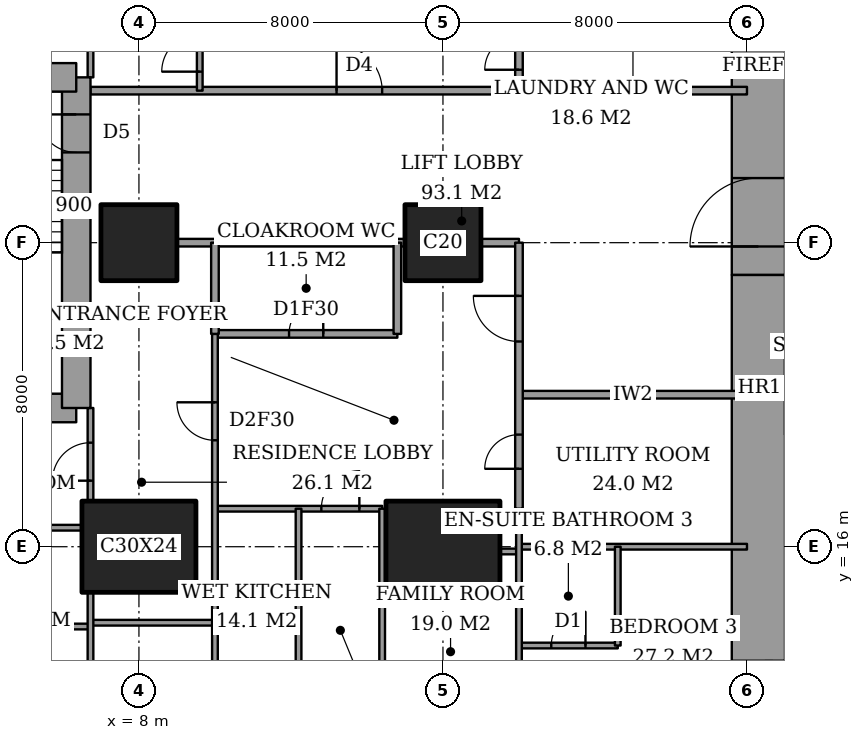
"""IFC4 building model, lengths in metres.
Left out: names, types, materials, properties, quantities, classifications, styles, units other than length and angle.
Written with IfcOpenShell. Run it as: python <this file> out.ifc"""

import sys

from ifc_helpers import new_model, si_unit, direction, frame, frame_2d, origin, origin_2d, place, context, subcontext, project, spatial, rectangle, extrude, element, fill, save


model = new_model("IFC4")
c1 = context("Model", 3, precision=1e-05, world=origin(), true_north=direction((0.0, 1.0)))
c2 = subcontext(c1, "Body", "Model", "MODEL_VIEW")
j1 = project(units=[si_unit("LENGTHUNIT", "METRE"), si_unit("PLANEANGLEUNIT", "RADIAN")], contexts=[c1])
p1 = place(None, origin())
s1 = spatial("IfcSite", under=j1, at=p1, CompositionType="ELEMENT")
p2 = place(p1, origin())
s2 = spatial("IfcBuilding", under=s1, at=p2, CompositionType="ELEMENT")
p3 = place(p2, frame((0.0, 0.0, 47.6)))
s3 = spatial("IfcBuildingStorey", under=s2, at=p3, CompositionType="ELEMENT", Elevation=47.6)
p4 = place(p3, frame((8.0, 16.0, 0.0), z_axis=(0.0, 0.0, 1.0), x_axis=(1.0, 0.0, 0.0)))
e1 = element("IfcColumn", 1, at=p4, inside=s3, PredefinedType="COLUMN", context=c2, shape_type="SweptSolid", body=[
    extrude(rectangle(XDim=3.0, YDim=2.4, at=origin_2d()), origin(), (0.0, 0.0, 1.0), 3.6),
])
p5 = place(p3, frame((8.0, 24.0, 0.0), z_axis=(0.0, 0.0, 1.0), x_axis=(1.0, 0.0, 0.0)))
e2 = element("IfcColumn", 2, at=p5, inside=s3, PredefinedType="COLUMN", context=c2, shape_type="SweptSolid", body=[
    extrude(rectangle(XDim=2.0, YDim=2.0, at=origin_2d()), origin(), (0.0, 0.0, 1.0), 3.6),
])
p6 = place(p3, frame((16.0, 16.0, 0.0), z_axis=(0.0, 0.0, 1.0), x_axis=(1.0, 0.0, 0.0)))
e3 = element("IfcColumn", 3, at=p6, inside=s3, PredefinedType="COLUMN", context=c2, shape_type="SweptSolid", body=[
    extrude(rectangle(XDim=3.0, YDim=2.4, at=origin_2d()), origin(), (0.0, 0.0, 1.0), 3.6),
])
p7 = place(p3, frame((16.0, 24.0, 0.0), z_axis=(0.0, 0.0, 1.0), x_axis=(1.0, 0.0, 0.0)))
e4 = element("IfcColumn", 4, at=p7, inside=s3, PredefinedType="COLUMN", context=c2, shape_type="SweptSolid", body=[
    extrude(rectangle(XDim=2.0, YDim=2.0, at=origin_2d()), origin(), (0.0, 0.0, 1.0), 3.6),
])
p8 = place(p3, frame((24.3, 13.0, 0.0), z_axis=(0.0, 0.0, 1.0), x_axis=(0.0, 1.0, 0.0)))
e5 = element("IfcWall", 5, at=p8, inside=s3, PredefinedType="SHEAR", context=c2, shape_type="SweptSolid", body=[
    extrude(rectangle(XDim=10.15, YDim=1.4, at=frame_2d((5.075, 0.0))), origin(), (0.0, 0.0, 1.0), 3.6),
])
p9 = place(p3, frame((24.3, 23.15, 0.0), z_axis=(0.0, 0.0, 1.0), x_axis=(0.0, 1.0, 0.0)))
e6 = element("IfcWall", 6, at=p9, inside=s3, PredefinedType="SHEAR", context=c2, shape_type="SweptSolid", body=[
    extrude(rectangle(XDim=11.85, YDim=1.4, at=frame_2d((5.925, 0.0))), origin(), (0.0, 0.0, 1.0), 3.6),
])
p10 = place(p9, frame((0.75, 0.0, 0.0)))
e7 = element("IfcOpeningElement", 7, at=p10, cuts=e6, PredefinedType="OPENING", context=c2, shape_type="SweptSolid", body=[
    extrude(rectangle(XDim=1.8, YDim=2.4, at=frame_2d((0.9, 1.2))), frame((0.0, 0.71, 0.0), z_axis=(0.0, -1.0, 0.0), x_axis=(1.0, 0.0, 0.0)), (0.0, 0.0, 1.0), 1.42),
])
p11 = place(p3, frame((1.9, 19.65, 0.0), z_axis=(0.0, 0.0, 1.0), x_axis=(1.0, 0.0, 0.0)))
e8 = element("IfcWall", 8, at=p11, inside=s3, PredefinedType="SHEAR", context=c2, shape_type="SweptSolid", body=[
    extrude(rectangle(XDim=4.45, YDim=0.75, at=frame_2d((2.225, 0.0))), origin(), (0.0, 0.0, 1.0), 3.6),
])
p12 = place(p3, frame((6.35, 19.65, 0.0), z_axis=(0.0, 0.0, 1.0), x_axis=(0.0, 1.0, 0.0)))
e9 = element("IfcWall", 9, at=p12, inside=s3, PredefinedType="SHEAR", context=c2, shape_type="SweptSolid", body=[
    extrude(rectangle(XDim=8.7, YDim=0.75, at=frame_2d((4.35, 0.0))), origin(), (0.0, 0.0, 1.0), 3.6),
])
p13 = place(p12, frame((6.725, 0.0, 0.0)))
e10 = element("IfcOpeningElement", 10, at=p13, cuts=e9, PredefinedType="OPENING", context=c2, shape_type="SweptSolid", body=[
    extrude(rectangle(XDim=1.0, YDim=2.1, at=frame_2d((0.5, 1.05))), frame((0.0, 0.385, 0.0), z_axis=(0.0, -1.0, 0.0), x_axis=(1.0, 0.0, 0.0)), (0.0, 0.0, 1.0), 0.77),
])
p14 = place(p3, frame((6.35, 28.35, 0.0), z_axis=(0.0, 0.0, 1.0), x_axis=(-1.0, 0.0, 0.0)))
e11 = element("IfcWall", 11, at=p14, inside=s3, PredefinedType="SHEAR", context=c2, shape_type="SweptSolid", body=[
    extrude(rectangle(XDim=4.45, YDim=0.75, at=frame_2d((2.225, 0.0))), origin(), (0.0, 0.0, 1.0), 3.6),
])
p15 = place(p3, frame((18.0, 13.4, 0.0), z_axis=(0.0, 0.0, 1.0), x_axis=(1.0, 0.0, 0.0)))
e12 = element("IfcWall", 12, at=p15, inside=s3, PredefinedType="PARTITIONING", context=c2, shape_type="SweptSolid", body=[
    extrude(rectangle(XDim=2.6, YDim=0.15, at=frame_2d((1.3, 0.0))), origin(), (0.0, 0.0, 1.0), 3.35),
])
p16 = place(p15, frame((0.85, 0.0, 0.0)))
e13 = element("IfcOpeningElement", 13, at=p16, cuts=e12, PredefinedType="OPENING", context=c2, shape_type="SweptSolid", body=[
    extrude(rectangle(XDim=0.9, YDim=2.1, at=frame_2d((0.45, 1.05))), frame((0.0, 0.085, 0.0), z_axis=(0.0, -1.0, 0.0), x_axis=(1.0, 0.0, 0.0)), (0.0, 0.0, 1.0), 0.17),
])
p17 = place(p3, frame((4.325, 13.9, 0.0), z_axis=(0.0, 0.0, 1.0), x_axis=(1.0, 0.0, 0.0)))
e14 = element("IfcWall", 14, at=p17, inside=s3, PredefinedType="PARTITIONING", context=c2, shape_type="SweptSolid", body=[
    extrude(rectangle(XDim=2.4, YDim=0.15, at=frame_2d((1.2, 0.0))), origin(), (0.0, 0.0, 1.0), 3.35),
])
p18 = place(p3, frame((6.725, 14.0, 0.0), z_axis=(0.0, 0.0, 1.0), x_axis=(1.0, 0.0, 0.0)))
e15 = element("IfcWall", 15, at=p18, inside=s3, PredefinedType="PARTITIONING", context=c2, shape_type="SweptSolid", body=[
    extrude(rectangle(XDim=3.275, YDim=0.15, at=frame_2d((1.637, 0.0))), origin(), (0.0, 0.0, 1.0), 3.35),
])
p19 = place(p3, frame((17.5, 15.875, 0.0), z_axis=(0.0, 0.0, 1.0), x_axis=(1.0, 0.0, 0.0)))
e16 = element("IfcWall", 16, at=p19, inside=s3, PredefinedType="PARTITIONING", context=c2, shape_type="SweptSolid", body=[
    extrude(rectangle(XDim=0.5, YDim=0.15, at=frame_2d((0.25, 0.0))), origin(), (0.0, 0.0, 1.0), 2.634),
])
p20 = place(p3, frame((18.0, 16.0, 0.0), z_axis=(0.0, 0.0, 1.0), x_axis=(1.0, 0.0, 0.0)))
e17 = element("IfcWall", 17, at=p20, inside=s3, PredefinedType="PARTITIONING", context=c2, shape_type="SweptSolid", body=[
    extrude(rectangle(XDim=6.0, YDim=0.15, at=frame_2d((3.0, 0.0))), origin(), (0.0, 0.0, 1.0), 2.634),
])
p21 = place(p3, frame((1.35, 16.5, 0.0), z_axis=(0.0, 0.0, 1.0), x_axis=(1.0, 0.0, 0.0)))
e18 = element("IfcWall", 18, at=p21, inside=s3, PredefinedType="PARTITIONING", context=c2, shape_type="SweptSolid", body=[
    extrude(rectangle(XDim=5.15, YDim=0.15, at=frame_2d((2.575, 0.0))), origin(), (0.0, 0.0, 1.0), 3.35),
])
p22 = place(p3, frame((10.0, 17.0, 0.0), z_axis=(0.0, 0.0, 1.0), x_axis=(1.0, 0.0, 0.0)))
e19 = element("IfcWall", 19, at=p22, inside=s3, PredefinedType="PARTITIONING", context=c2, shape_type="SweptSolid", body=[
    extrude(rectangle(XDim=4.4, YDim=0.15, at=frame_2d((2.2, 0.0))), origin(), (0.0, 0.0, 1.0), 3.35),
])
p23 = place(p22, frame((2.8, 0.0, 0.0)))
e20 = element("IfcOpeningElement", 20, at=p23, cuts=e19, PredefinedType="OPENING", context=c2, shape_type="SweptSolid", body=[
    extrude(rectangle(XDim=1.0, YDim=2.1, at=frame_2d((0.5, 1.05))), frame((0.0, 0.085, 0.0), z_axis=(0.0, -1.0, 0.0), x_axis=(1.0, 0.0, 0.0)), (0.0, 0.0, 1.0), 0.17),
])
p24 = place(p3, frame((18.0, 20.0, 0.0), z_axis=(0.0, 0.0, 1.0), x_axis=(1.0, 0.0, 0.0)))
e21 = element("IfcWall", 21, at=p24, inside=s3, PredefinedType="PARTITIONING", context=c2, shape_type="SweptSolid", body=[
    extrude(rectangle(XDim=6.0, YDim=0.2, at=frame_2d((3.0, 0.0))), origin(), (0.0, 0.0, 1.0), 3.35),
])
p25 = place(p3, frame((10.0, 21.6, 0.0), z_axis=(0.0, 0.0, 1.0), x_axis=(1.0, 0.0, 0.0)))
e22 = element("IfcWall", 22, at=p25, inside=s3, PredefinedType="PARTITIONING", context=c2, shape_type="SweptSolid", body=[
    extrude(rectangle(XDim=4.8, YDim=0.2, at=frame_2d((2.4, 0.0))), origin(), (0.0, 0.0, 1.0), 3.35),
])
p26 = place(p25, frame((1.95, 0.0, 0.0)))
e23 = element("IfcOpeningElement", 23, at=p26, cuts=e22, PredefinedType="OPENING", context=c2, shape_type="SweptSolid", body=[
    extrude(rectangle(XDim=0.9, YDim=2.1, at=frame_2d((0.45, 1.05))), frame((0.0, 0.11, 0.0), z_axis=(0.0, -1.0, 0.0), x_axis=(1.0, 0.0, 0.0)), (0.0, 0.0, 1.0), 0.22),
])
p27 = place(p3, frame((9.0, 24.0, 0.0), z_axis=(0.0, 0.0, 1.0), x_axis=(1.0, 0.0, 0.0)))
e24 = element("IfcWall", 24, at=p27, inside=s3, PredefinedType="PARTITIONING", context=c2, shape_type="SweptSolid", body=[
    extrude(rectangle(XDim=6.0, YDim=0.2, at=frame_2d((3.0, 0.0))), origin(), (0.0, 0.0, 1.0), 3.35),
])
p28 = place(p3, frame((17.0, 24.0, 0.0), z_axis=(0.0, 0.0, 1.0), x_axis=(1.0, 0.0, 0.0)))
e25 = element("IfcWall", 25, at=p28, inside=s3, PredefinedType="PARTITIONING", context=c2, shape_type="SweptSolid", body=[
    extrude(rectangle(XDim=1.0, YDim=0.2, at=frame_2d((0.5, 0.0))), origin(), (0.0, 0.0, 1.0), 3.35),
])
p29 = place(p3, frame((6.725, 28.0, 0.0), z_axis=(0.0, 0.0, 1.0), x_axis=(1.0, 0.0, 0.0)))
e26 = element("IfcWall", 26, at=p29, inside=s3, PredefinedType="PARTITIONING", context=c2, shape_type="SweptSolid", body=[
    extrude(rectangle(XDim=17.275, YDim=0.2, at=frame_2d((8.637, 0.0))), origin(), (0.0, 0.0, 1.0), 3.35),
])
p30 = place(p29, frame((6.475, 0.0, 0.0)))
e27 = element("IfcOpeningElement", 27, at=p30, cuts=e26, PredefinedType="OPENING", context=c2, shape_type="SweptSolid", body=[
    extrude(rectangle(XDim=1.2, YDim=2.4, at=frame_2d((0.6, 1.2))), frame((0.0, 0.11, 0.0), z_axis=(0.0, -1.0, 0.0), x_axis=(1.0, 0.0, 0.0)), (0.0, 0.0, 1.0), 0.22),
])
p31 = place(p3, frame((6.725, 10.6, 0.0), z_axis=(0.0, 0.0, 1.0), x_axis=(0.0, 1.0, 0.0)))
e28 = element("IfcWall", 28, at=p31, inside=s3, PredefinedType="PARTITIONING", context=c2, shape_type="SweptSolid", body=[
    extrude(rectangle(XDim=4.2, YDim=0.15, at=frame_2d((2.1, 0.0))), origin(), (0.0, 0.0, 1.0), 3.35),
])
p32 = place(p31, frame((1.2, 0.0, 0.0)))
e29 = element("IfcOpeningElement", 29, at=p32, cuts=e28, PredefinedType="OPENING", context=c2, shape_type="SweptSolid", body=[
    extrude(rectangle(XDim=0.9, YDim=2.1, at=frame_2d((0.45, 1.05))), frame((0.0, 0.085, 0.0), z_axis=(0.0, -1.0, 0.0), x_axis=(1.0, 0.0, 0.0)), (0.0, 0.0, 1.0), 0.17),
])
p33 = place(p3, frame((6.725, 17.2, 0.0), z_axis=(0.0, 0.0, 1.0), x_axis=(0.0, 1.0, 0.0)))
e30 = element("IfcWall", 30, at=p33, inside=s3, PredefinedType="PARTITIONING", context=c2, shape_type="SweptSolid", body=[
    extrude(rectangle(XDim=2.45, YDim=0.15, at=frame_2d((1.225, 0.0))), origin(), (0.0, 0.0, 1.0), 3.35),
])
p34 = place(p33, frame((0.538, 0.0, 0.0)))
e31 = element("IfcOpeningElement", 31, at=p34, cuts=e30, PredefinedType="OPENING", context=c2, shape_type="SweptSolid", body=[
    extrude(rectangle(XDim=1.0, YDim=2.1, at=frame_2d((0.5, 1.05))), frame((0.0, 0.085, 0.0), z_axis=(0.0, -1.0, 0.0), x_axis=(1.0, 0.0, 0.0)), (0.0, 0.0, 1.0), 0.17),
])
p35 = place(p3, frame((6.725, 28.35, 0.0), z_axis=(0.0, 0.0, 1.0), x_axis=(0.0, 1.0, 0.0)))
e32 = element("IfcWall", 32, at=p35, inside=s3, PredefinedType="PARTITIONING", context=c2, shape_type="SweptSolid", body=[
    extrude(rectangle(XDim=2.45, YDim=0.15, at=frame_2d((1.225, 0.0))), origin(), (0.0, 0.0, 1.0), 3.35),
])
p36 = place(p35, frame((0.913, 0.0, 0.0)))
e33 = element("IfcOpeningElement", 33, at=p36, cuts=e32, PredefinedType="OPENING", context=c2, shape_type="SweptSolid", body=[
    extrude(rectangle(XDim=1.0, YDim=2.1, at=frame_2d((0.5, 1.05))), frame((0.0, 0.085, 0.0), z_axis=(0.0, -1.0, 0.0), x_axis=(1.0, 0.0, 0.0)), (0.0, 0.0, 1.0), 0.17),
])
p37 = place(p3, frame((9.6, 28.0, 0.0), z_axis=(0.0, 0.0, 1.0), x_axis=(0.0, 1.0, 0.0)))
e34 = element("IfcWall", 34, at=p37, inside=s3, PredefinedType="PARTITIONING", context=c2, shape_type="SweptSolid", body=[
    extrude(rectangle(XDim=9.4, YDim=0.15, at=frame_2d((4.7, 0.0))), origin(), (0.0, 0.0, 1.0), 3.35),
])
p38 = place(p37, frame((0.5, 0.0, 0.0)))
e35 = element("IfcOpeningElement", 35, at=p38, cuts=e34, PredefinedType="OPENING", context=c2, shape_type="SweptSolid", body=[
    extrude(rectangle(XDim=1.0, YDim=2.1, at=frame_2d((0.5, 1.05))), frame((0.0, 0.085, 0.0), z_axis=(0.0, -1.0, 0.0), x_axis=(1.0, 0.0, 0.0)), (0.0, 0.0, 1.0), 0.17),
])
p39 = place(p3, frame((10.0, 21.6, 0.0), z_axis=(0.0, 0.0, 1.0), x_axis=(0.0, 1.0, 0.0)))
e36 = element("IfcWall", 36, at=p39, inside=s3, PredefinedType="PARTITIONING", context=c2, shape_type="SweptSolid", body=[
    extrude(rectangle(XDim=2.4, YDim=0.2, at=frame_2d((1.2, 0.0))), origin(), (0.0, 0.0, 1.0), 3.35),
])
p40 = place(p3, frame((10.0, 10.6, 0.0), z_axis=(0.0, 0.0, 1.0), x_axis=(0.0, 1.0, 0.0)))
e37 = element("IfcWall", 37, at=p40, inside=s3, PredefinedType="PARTITIONING", context=c2, shape_type="SweptSolid", body=[
    extrude(rectangle(XDim=11.0, YDim=0.15, at=frame_2d((5.5, 0.0))), origin(), (0.0, 0.0, 1.0), 3.35),
])
p41 = place(p40, frame((8.2, 0.0, 0.0)))
e38 = element("IfcOpeningElement", 38, at=p41, cuts=e37, PredefinedType="OPENING", context=c2, shape_type="SweptSolid", body=[
    extrude(rectangle(XDim=1.0, YDim=2.1, at=frame_2d((0.5, 1.05))), frame((0.0, 0.085, 0.0), z_axis=(0.0, -1.0, 0.0), x_axis=(1.0, 0.0, 0.0)), (0.0, 0.0, 1.0), 0.17),
])
for number, where, z_axis, x_axis in (
    (39, (12.2, 10.6, 0.0), (0.0, 0.0, 1.0), (0.0, 1.0, 0.0)),
    (40, (14.4, 10.6, 0.0), (0.0, 0.0, 1.0), (0.0, 1.0, 0.0)),
):
    element("IfcWall", number, at=place(p3, frame(where, z_axis=z_axis, x_axis=x_axis)), inside=s3, PredefinedType="PARTITIONING", context=c2, shape_type="SweptSolid", body=[
        extrude(rectangle(XDim=6.4, YDim=0.15, at=frame_2d((3.2, 0.0))), origin(), (0.0, 0.0, 1.0), 3.35),
    ])
p42 = place(p3, frame((14.8, 21.6, 0.0), z_axis=(0.0, 0.0, 1.0), x_axis=(0.0, 1.0, 0.0)))
e41 = element("IfcWall", 41, at=p42, inside=s3, PredefinedType="PARTITIONING", context=c2, shape_type="SweptSolid", body=[
    extrude(rectangle(XDim=2.4, YDim=0.2, at=frame_2d((1.2, 0.0))), origin(), (0.0, 0.0, 1.0), 3.35),
])
p43 = place(p3, frame((18.0, 17.0, 0.0), z_axis=(0.0, 0.0, 1.0), x_axis=(0.0, 1.0, 0.0)))
e42 = element("IfcWall", 42, at=p43, inside=s3, PredefinedType="PARTITIONING", context=c2, shape_type="SweptSolid", body=[
    extrude(rectangle(XDim=7.0, YDim=0.2, at=frame_2d((3.5, 0.0))), origin(), (0.0, 0.0, 1.0), 3.35),
])
p44 = place(p43, frame((4.4, 0.0, 0.0)))
e43 = element("IfcOpeningElement", 43, at=p44, cuts=e42, PredefinedType="OPENING", context=c2, shape_type="SweptSolid", body=[
    extrude(rectangle(XDim=1.2, YDim=2.4, at=frame_2d((0.6, 1.2))), frame((0.0, 0.11, 0.0), z_axis=(0.0, -1.0, 0.0), x_axis=(1.0, 0.0, 0.0)), (0.0, 0.0, 1.0), 0.22),
])
p45 = place(p43, frame((1.05, 0.0, 0.0)))
e44 = element("IfcOpeningElement", 44, at=p45, cuts=e42, PredefinedType="OPENING", context=c2, shape_type="SweptSolid", body=[
    extrude(rectangle(XDim=0.9, YDim=2.1, at=frame_2d((0.45, 1.05))), frame((0.0, 0.11, 0.0), z_axis=(0.0, -1.0, 0.0), x_axis=(1.0, 0.0, 0.0)), (0.0, 0.0, 1.0), 0.22),
])
p46 = place(p3, frame((18.0, 28.0, 0.0), z_axis=(0.0, 0.0, 1.0), x_axis=(0.0, 1.0, 0.0)))
e45 = element("IfcWall", 45, at=p46, inside=s3, PredefinedType="PARTITIONING", context=c2, shape_type="SweptSolid", body=[
    extrude(rectangle(XDim=3.1, YDim=0.2, at=frame_2d((1.55, 0.0))), origin(), (0.0, 0.0, 1.0), 3.35),
])
p47 = place(p46, frame((0.55, 0.0, 0.0)))
e46 = element("IfcOpeningElement", 46, at=p47, cuts=e45, PredefinedType="OPENING", context=c2, shape_type="SweptSolid", body=[
    extrude(rectangle(XDim=0.9, YDim=2.1, at=frame_2d((0.45, 1.05))), frame((0.0, 0.11, 0.0), z_axis=(0.0, -1.0, 0.0), x_axis=(1.0, 0.0, 0.0)), (0.0, 0.0, 1.0), 0.22),
])
p48 = place(p3, frame((18.0, 10.6, 0.0), z_axis=(0.0, 0.0, 1.0), x_axis=(0.0, 1.0, 0.0)))
e47 = element("IfcWall", 47, at=p48, inside=s3, PredefinedType="PARTITIONING", context=c2, shape_type="SweptSolid", body=[
    extrude(rectangle(XDim=6.4, YDim=0.15, at=frame_2d((3.2, 0.0))), origin(), (0.0, 0.0, 1.0), 3.35),
])
p49 = place(p3, frame((20.6, 13.4, 0.0), z_axis=(0.0, 0.0, 1.0), x_axis=(0.0, 1.0, 0.0)))
e48 = element("IfcWall", 48, at=p49, inside=s3, PredefinedType="PARTITIONING", context=c2, shape_type="SweptSolid", body=[
    extrude(rectangle(XDim=2.6, YDim=0.15, at=frame_2d((1.3, 0.0))), origin(), (0.0, 0.0, 1.0), 3.35),
])
p50 = place(p34, origin())
e49 = element("IfcDoor", 49, at=p50, inside=s3, OperationType="SINGLE_SWING_RIGHT", PredefinedType="DOOR", context=c2, shape_type="SweptSolid", body=[
    extrude(rectangle(XDim=1.0, YDim=2.1, at=frame_2d((0.5, 1.05))), frame((0.0, 0.025, 0.0), z_axis=(0.0, -1.0, 0.0), x_axis=(1.0, 0.0, 0.0)), (0.0, 0.0, 1.0), 0.05),
])
fill(e31, e49)
p51 = place(p41, origin())
e50 = element("IfcDoor", 50, at=p51, inside=s3, OperationType="SINGLE_SWING_LEFT", PredefinedType="DOOR", context=c2, shape_type="SweptSolid", body=[
    extrude(rectangle(XDim=1.0, YDim=2.1, at=frame_2d((0.5, 1.05))), frame((0.0, 0.025, 0.0), z_axis=(0.0, -1.0, 0.0), x_axis=(1.0, 0.0, 0.0)), (0.0, 0.0, 1.0), 0.05),
])
fill(e38, e50)
p52 = place(p26, origin())
e51 = element("IfcDoor", 51, at=p52, inside=s3, OperationType="SINGLE_SWING_LEFT", PredefinedType="DOOR", context=c2, shape_type="SweptSolid", body=[
    extrude(rectangle(XDim=0.9, YDim=2.1, at=frame_2d((0.45, 1.05))), frame((0.0, 0.025, 0.0), z_axis=(0.0, -1.0, 0.0), x_axis=(1.0, 0.0, 0.0)), (0.0, 0.0, 1.0), 0.05),
])
fill(e23, e51)
p53 = place(p44, origin())
e52 = element("IfcDoor", 52, at=p53, inside=s3, OperationType="SINGLE_SWING_LEFT", PredefinedType="DOOR", context=c2, shape_type="SweptSolid", body=[
    extrude(rectangle(XDim=1.2, YDim=2.4, at=frame_2d((0.6, 1.2))), frame((0.0, 0.025, 0.0), z_axis=(0.0, -1.0, 0.0), x_axis=(1.0, 0.0, 0.0)), (0.0, 0.0, 1.0), 0.05),
])
fill(e43, e52)
p54 = place(p23, origin())
e53 = element("IfcDoor", 53, at=p54, inside=s3, OperationType="SINGLE_SWING_LEFT", PredefinedType="DOOR", context=c2, shape_type="SweptSolid", body=[
    extrude(rectangle(XDim=1.0, YDim=2.1, at=frame_2d((0.5, 1.05))), frame((0.0, 0.025, 0.0), z_axis=(0.0, -1.0, 0.0), x_axis=(1.0, 0.0, 0.0)), (0.0, 0.0, 1.0), 0.05),
])
fill(e20, e53)
p55 = place(p16, origin())
e54 = element("IfcDoor", 54, at=p55, inside=s3, OperationType="SINGLE_SWING_LEFT", PredefinedType="DOOR", context=c2, shape_type="SweptSolid", body=[
    extrude(rectangle(XDim=0.9, YDim=2.1, at=frame_2d((0.45, 1.05))), frame((0.0, 0.025, 0.0), z_axis=(0.0, -1.0, 0.0), x_axis=(1.0, 0.0, 0.0)), (0.0, 0.0, 1.0), 0.05),
])
fill(e13, e54)
p56 = place(p45, origin())
e55 = element("IfcDoor", 55, at=p56, inside=s3, OperationType="SINGLE_SWING_RIGHT", PredefinedType="DOOR", context=c2, shape_type="SweptSolid", body=[
    extrude(rectangle(XDim=0.9, YDim=2.1, at=frame_2d((0.45, 1.05))), frame((0.0, 0.025, 0.0), z_axis=(0.0, -1.0, 0.0), x_axis=(1.0, 0.0, 0.0)), (0.0, 0.0, 1.0), 0.05),
])
fill(e44, e55)
p57 = place(p38, origin())
e56 = element("IfcDoor", 56, at=p57, inside=s3, OperationType="SINGLE_SWING_RIGHT", PredefinedType="DOOR", context=c2, shape_type="SweptSolid", body=[
    extrude(rectangle(XDim=1.0, YDim=2.1, at=frame_2d((0.5, 1.05))), frame((0.0, 0.025, 0.0), z_axis=(0.0, -1.0, 0.0), x_axis=(1.0, 0.0, 0.0)), (0.0, 0.0, 1.0), 0.05),
])
fill(e35, e56)
p58 = place(p30, origin())
e57 = element("IfcDoor", 57, at=p58, inside=s3, OperationType="SINGLE_SWING_RIGHT", PredefinedType="DOOR", context=c2, shape_type="SweptSolid", body=[
    extrude(rectangle(XDim=1.2, YDim=2.4, at=frame_2d((0.6, 1.2))), frame((0.0, 0.025, 0.0), z_axis=(0.0, -1.0, 0.0), x_axis=(1.0, 0.0, 0.0)), (0.0, 0.0, 1.0), 0.05),
])
fill(e27, e57)
p59 = place(p47, origin())
e58 = element("IfcDoor", 58, at=p59, inside=s3, OperationType="SINGLE_SWING_RIGHT", PredefinedType="DOOR", context=c2, shape_type="SweptSolid", body=[
    extrude(rectangle(XDim=0.9, YDim=2.1, at=frame_2d((0.45, 1.05))), frame((0.0, 0.025, 0.0), z_axis=(0.0, -1.0, 0.0), x_axis=(1.0, 0.0, 0.0)), (0.0, 0.0, 1.0), 0.05),
])
fill(e46, e58)
p60 = place(p10, origin())
e59 = element("IfcDoor", 59, at=p60, inside=s3, OperationType="DOUBLE_DOOR_DOUBLE_SWING", PredefinedType="DOOR", context=c2, shape_type="SweptSolid", body=[
    extrude(rectangle(XDim=1.8, YDim=2.4, at=frame_2d((0.9, 1.2))), frame((0.0, 0.025, 0.0), z_axis=(0.0, -1.0, 0.0), x_axis=(1.0, 0.0, 0.0)), (0.0, 0.0, 1.0), 0.05),
])
fill(e7, e59)
p61 = place(p13, origin())
e60 = element("IfcDoor", 60, at=p61, inside=s3, OperationType="SINGLE_SWING_LEFT", PredefinedType="DOOR", context=c2, shape_type="SweptSolid", body=[
    extrude(rectangle(XDim=1.0, YDim=2.1, at=frame_2d((0.5, 1.05))), frame((0.0, 0.025, 0.0), z_axis=(0.0, -1.0, 0.0), x_axis=(1.0, 0.0, 0.0)), (0.0, 0.0, 1.0), 0.05),
])
fill(e10, e60)
save(model, sys.argv[1])
